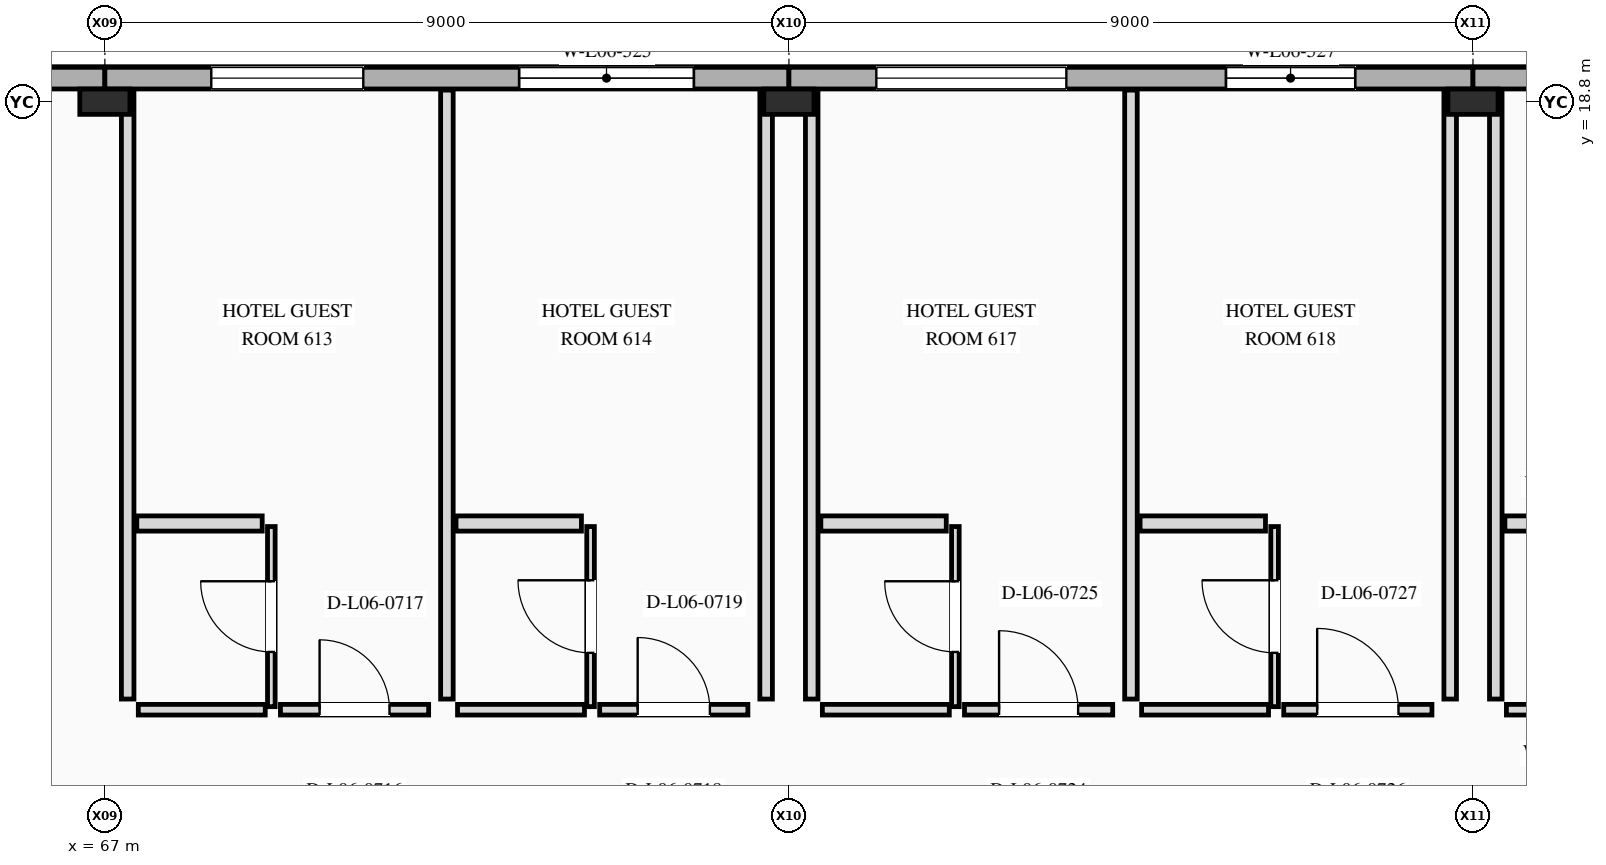
"""IFC4 building model, lengths in metres.
Left out: names, types, materials, properties, quantities, classifications, styles, units other than length and angle.
Written with IfcOpenShell. Run it as: python <this file> out.ifc"""

import sys

from ifc_helpers import new_model, si_unit, direction, frame, frame_2d, origin, origin_2d, place, context, subcontext, project, spatial, rectangle, i_section, extrude, element, fill, save


model = new_model("IFC4")
c1 = context("Model", 3, precision=1e-05, world=origin(), true_north=direction((0.0, 1.0)))
c2 = subcontext(c1, "Body", "Model", "MODEL_VIEW")
j1 = project(units=[si_unit("LENGTHUNIT", "METRE"), si_unit("PLANEANGLEUNIT", "RADIAN")], contexts=[c1])
p1 = place(None, origin())
s1 = spatial("IfcSite", under=j1, at=p1, CompositionType="ELEMENT")
p2 = place(p1, origin())
s2 = spatial("IfcBuilding", under=s1, at=p2, CompositionType="ELEMENT")
p3 = place(p2, frame((0.0, 0.0, 27.0)))
s3 = spatial("IfcBuildingStorey", under=s2, at=p3, CompositionType="ELEMENT", Elevation=27.0)
for number, where, z_axis, x_axis in (
    (1, (67.0, 18.8, 0.0), (0.0, 0.0, 1.0), (0.0, 1.0, 0.0)),
    (2, (76.0, 18.8, 0.0), (0.0, 0.0, 1.0), (0.0, 1.0, 0.0)),
    (3, (85.0, 18.8, 0.0), (0.0, 0.0, 1.0), (0.0, 1.0, 0.0)),
):
    element("IfcColumn", number, at=place(p3, frame(where, z_axis=z_axis, x_axis=x_axis)), inside=s3, PredefinedType="COLUMN", context=c2, shape_type="SweptSolid", body=[
        extrude(i_section(OverallWidth=0.333, OverallDepth=0.66, WebThickness=0.024, FlangeThickness=0.044, at=origin_2d()), origin(), (0.0, 0.0, 1.0), 3.6),
    ])
p4 = place(p3, frame((67.0, 19.11, 0.0), z_axis=(0.0, 0.0, 1.0), x_axis=(-1.0, 0.0, 0.0)))
e4 = element("IfcWall", 4, at=p4, inside=s3, PredefinedType="STANDARD", context=c2, shape_type="SweptSolid", body=[
    extrude(rectangle(XDim=9.0, YDim=0.285, at=frame_2d((4.5, 0.0))), origin(), (0.0, 0.0, 1.0), 3.6),
])
p5 = place(p3, frame((76.0, 19.11, 0.0), z_axis=(0.0, 0.0, 1.0), x_axis=(-1.0, 0.0, 0.0)))
e5 = element("IfcWall", 5, at=p5, inside=s3, PredefinedType="STANDARD", context=c2, shape_type="SweptSolid", body=[
    extrude(rectangle(XDim=9.0, YDim=0.285, at=frame_2d((4.5, 0.0))), origin(), (0.0, 0.0, 1.0), 3.6),
])
p6 = place(p5, frame((5.6, 0.0, 0.85)))
e6 = element("IfcOpeningElement", 6, at=p6, cuts=e5, PredefinedType="OPENING", context=c2, shape_type="SweptSolid", body=[
    extrude(rectangle(XDim=2.0, YDim=1.65, at=frame_2d((1.0, 0.825))), frame((0.0, 0.152, 0.0), z_axis=(0.0, -1.0, 0.0), x_axis=(1.0, 0.0, 0.0)), (0.0, 0.0, 1.0), 0.305),
])
p7 = place(p5, frame((1.25, 0.0, 0.85)))
e7 = element("IfcOpeningElement", 7, at=p7, cuts=e5, PredefinedType="OPENING", context=c2, shape_type="SweptSolid", body=[
    extrude(rectangle(XDim=2.3, YDim=1.7, at=frame_2d((1.15, 0.85))), frame((0.0, 0.152, 0.0), z_axis=(0.0, -1.0, 0.0), x_axis=(1.0, 0.0, 0.0)), (0.0, 0.0, 1.0), 0.305),
])
p8 = place(p3, frame((85.0, 19.11, 0.0), z_axis=(0.0, 0.0, 1.0), x_axis=(-1.0, 0.0, 0.0)))
e8 = element("IfcWall", 8, at=p8, inside=s3, PredefinedType="STANDARD", context=c2, shape_type="SweptSolid", body=[
    extrude(rectangle(XDim=9.0, YDim=0.285, at=frame_2d((4.5, 0.0))), origin(), (0.0, 0.0, 1.0), 3.6),
])
p9 = place(p8, frame((5.35, 0.0, 0.85)))
e9 = element("IfcOpeningElement", 9, at=p9, cuts=e8, PredefinedType="OPENING", context=c2, shape_type="SweptSolid", body=[
    extrude(rectangle(XDim=2.5, YDim=1.75, at=frame_2d((1.25, 0.875))), frame((0.0, 0.152, 0.0), z_axis=(0.0, -1.0, 0.0), x_axis=(1.0, 0.0, 0.0)), (0.0, 0.0, 1.0), 0.305),
])
p10 = place(p8, frame((1.55, 0.0, 0.85)))
e10 = element("IfcOpeningElement", 10, at=p10, cuts=e8, PredefinedType="OPENING", context=c2, shape_type="SweptSolid", body=[
    extrude(rectangle(XDim=1.7, YDim=1.6, at=frame_2d((0.85, 0.8))), frame((0.0, 0.152, 0.0), z_axis=(0.0, -1.0, 0.0), x_axis=(1.0, 0.0, 0.0)), (0.0, 0.0, 1.0), 0.305),
])
p11 = place(p3, frame((94.0, 19.11, 0.0), z_axis=(0.0, 0.0, 1.0), x_axis=(-1.0, 0.0, 0.0)))
e11 = element("IfcWall", 11, at=p11, inside=s3, PredefinedType="STANDARD", context=c2, shape_type="SweptSolid", body=[
    extrude(rectangle(XDim=9.0, YDim=0.285, at=frame_2d((4.5, 0.0))), origin(), (0.0, 0.0, 1.0), 3.6),
])
p12 = place(p3, frame((67.44, 10.8, 0.0), z_axis=(0.0, 0.0, 1.0), x_axis=(1.0, 0.0, 0.0)))
e12 = element("IfcWall", 12, at=p12, inside=s3, PredefinedType="PARTITIONING", context=c2, shape_type="SweptSolid", body=[
    extrude(rectangle(XDim=1.67, YDim=0.14, at=frame_2d((0.835, 0.0))), origin(), (0.0, 0.0, 1.0), 3.29),
])
p13 = place(p3, frame((69.31, 10.8, 0.0), z_axis=(0.0, 0.0, 1.0), x_axis=(1.0, 0.0, 0.0)))
e13 = element("IfcWall", 13, at=p13, inside=s3, PredefinedType="PARTITIONING", context=c2, shape_type="SweptSolid", body=[
    extrude(rectangle(XDim=1.95, YDim=0.14, at=frame_2d((0.975, 0.0))), origin(), (0.0, 0.0, 1.0), 3.29),
])
p14 = place(p13, frame((0.515, 0.0, 0.0)))
e14 = element("IfcOpeningElement", 14, at=p14, cuts=e13, PredefinedType="OPENING", context=c2, shape_type="SweptSolid", body=[
    extrude(rectangle(XDim=0.92, YDim=2.3, at=frame_2d((0.46, 1.15))), frame((0.0, 0.08, 0.0), z_axis=(0.0, -1.0, 0.0), x_axis=(1.0, 0.0, 0.0)), (0.0, 0.0, 1.0), 0.16),
])
p15 = place(p3, frame((67.3, 10.94, 0.0), z_axis=(0.0, 0.0, 1.0), x_axis=(0.0, 1.0, 0.0)))
e15 = element("IfcWall", 15, at=p15, inside=s3, PredefinedType="PARTITIONING", context=c2, shape_type="SweptSolid", body=[
    extrude(rectangle(XDim=8.012, YDim=0.165, at=frame_2d((4.006, 0.0))), origin(), (0.0, 0.0, 1.0), 2.619),
])
p16 = place(p3, frame((71.5, 10.94, 0.0), z_axis=(0.0, 0.0, 1.0), x_axis=(0.0, 1.0, 0.0)))
e16 = element("IfcWall", 16, at=p16, inside=s3, PredefinedType="PARTITIONING", context=c2, shape_type="SweptSolid", body=[
    extrude(rectangle(XDim=8.012, YDim=0.165, at=frame_2d((4.006, 0.0))), origin(), (0.0, 0.0, 1.0), 2.703),
])
p17 = place(p3, frame((69.19, 10.84, 0.0), z_axis=(0.0, 0.0, 1.0), x_axis=(0.0, 1.0, 0.0)))
e17 = element("IfcWall", 17, at=p17, inside=s3, PredefinedType="PARTITIONING", context=c2, shape_type="SweptSolid", body=[
    extrude(rectangle(XDim=2.37, YDim=0.1, at=frame_2d((1.185, 0.0))), origin(), (0.0, 0.0, 1.0), 2.898),
])
p18 = place(p17, frame((0.72, 0.0, 0.0)))
e18 = element("IfcOpeningElement", 18, at=p18, cuts=e17, PredefinedType="OPENING", context=c2, shape_type="SweptSolid", body=[
    extrude(rectangle(XDim=0.93, YDim=2.14, at=frame_2d((0.465, 1.07))), frame((0.0, 0.06, 0.0), z_axis=(0.0, -1.0, 0.0), x_axis=(1.0, 0.0, 0.0)), (0.0, 0.0, 1.0), 0.12),
])
p19 = place(p3, frame((67.42, 13.25, 0.0), z_axis=(0.0, 0.0, 1.0), x_axis=(1.0, 0.0, 0.0)))
e19 = element("IfcWall", 19, at=p19, inside=s3, PredefinedType="PLUMBINGWALL", context=c2, shape_type="SweptSolid", body=[
    extrude(rectangle(XDim=1.65, YDim=0.2, at=frame_2d((0.825, 0.0))), origin(), (0.0, 0.0, 1.0), 3.29),
])
p20 = place(p3, frame((71.64, 10.8, 0.0), z_axis=(0.0, 0.0, 1.0), x_axis=(1.0, 0.0, 0.0)))
e20 = element("IfcWall", 20, at=p20, inside=s3, PredefinedType="PARTITIONING", context=c2, shape_type="SweptSolid", body=[
    extrude(rectangle(XDim=1.67, YDim=0.14, at=frame_2d((0.835, 0.0))), origin(), (0.0, 0.0, 1.0), 3.29),
])
p21 = place(p3, frame((73.51, 10.8, 0.0), z_axis=(0.0, 0.0, 1.0), x_axis=(1.0, 0.0, 0.0)))
e21 = element("IfcWall", 21, at=p21, inside=s3, PredefinedType="PARTITIONING", context=c2, shape_type="SweptSolid", body=[
    extrude(rectangle(XDim=1.95, YDim=0.14, at=frame_2d((0.975, 0.0))), origin(), (0.0, 0.0, 1.0), 3.29),
])
p22 = place(p21, frame((0.5, 0.0, 0.0)))
e22 = element("IfcOpeningElement", 22, at=p22, cuts=e21, PredefinedType="OPENING", context=c2, shape_type="SweptSolid", body=[
    extrude(rectangle(XDim=0.95, YDim=2.3, at=frame_2d((0.475, 1.15))), frame((0.0, 0.08, 0.0), z_axis=(0.0, -1.0, 0.0), x_axis=(1.0, 0.0, 0.0)), (0.0, 0.0, 1.0), 0.16),
])
p23 = place(p3, frame((75.7, 10.94, 0.0), z_axis=(0.0, 0.0, 1.0), x_axis=(0.0, 1.0, 0.0)))
e23 = element("IfcWall", 23, at=p23, inside=s3, PredefinedType="PARTITIONING", context=c2, shape_type="SweptSolid", body=[
    extrude(rectangle(XDim=8.012, YDim=0.165, at=frame_2d((4.006, 0.0))), origin(), (0.0, 0.0, 1.0), 2.619),
])
p24 = place(p3, frame((73.39, 10.84, 0.0), z_axis=(0.0, 0.0, 1.0), x_axis=(0.0, 1.0, 0.0)))
e24 = element("IfcWall", 24, at=p24, inside=s3, PredefinedType="PARTITIONING", context=c2, shape_type="SweptSolid", body=[
    extrude(rectangle(XDim=2.37, YDim=0.1, at=frame_2d((1.185, 0.0))), origin(), (0.0, 0.0, 1.0), 2.898),
])
p25 = place(p24, frame((0.708, 0.0, 0.0)))
e25 = element("IfcOpeningElement", 25, at=p25, cuts=e24, PredefinedType="OPENING", context=c2, shape_type="SweptSolid", body=[
    extrude(rectangle(XDim=0.955, YDim=2.14, at=frame_2d((0.478, 1.07))), frame((0.0, 0.06, 0.0), z_axis=(0.0, -1.0, 0.0), x_axis=(1.0, 0.0, 0.0)), (0.0, 0.0, 1.0), 0.12),
])
p26 = place(p3, frame((71.62, 13.25, 0.0), z_axis=(0.0, 0.0, 1.0), x_axis=(1.0, 0.0, 0.0)))
e26 = element("IfcWall", 26, at=p26, inside=s3, PredefinedType="PLUMBINGWALL", context=c2, shape_type="SweptSolid", body=[
    extrude(rectangle(XDim=1.65, YDim=0.2, at=frame_2d((0.825, 0.0))), origin(), (0.0, 0.0, 1.0), 3.29),
])
p27 = place(p3, frame((76.44, 10.8, 0.0), z_axis=(0.0, 0.0, 1.0), x_axis=(1.0, 0.0, 0.0)))
e27 = element("IfcWall", 27, at=p27, inside=s3, PredefinedType="PARTITIONING", context=c2, shape_type="SweptSolid", body=[
    extrude(rectangle(XDim=1.67, YDim=0.14, at=frame_2d((0.835, 0.0))), origin(), (0.0, 0.0, 1.0), 3.29),
])
p28 = place(p3, frame((78.31, 10.8, 0.0), z_axis=(0.0, 0.0, 1.0), x_axis=(1.0, 0.0, 0.0)))
e28 = element("IfcWall", 28, at=p28, inside=s3, PredefinedType="PARTITIONING", context=c2, shape_type="SweptSolid", body=[
    extrude(rectangle(XDim=1.95, YDim=0.14, at=frame_2d((0.975, 0.0))), origin(), (0.0, 0.0, 1.0), 3.29),
])
p29 = place(p28, frame((0.455, 0.0, 0.0)))
e29 = element("IfcOpeningElement", 29, at=p29, cuts=e28, PredefinedType="OPENING", context=c2, shape_type="SweptSolid", body=[
    extrude(rectangle(XDim=1.04, YDim=2.4, at=frame_2d((0.52, 1.2))), frame((0.0, 0.08, 0.0), z_axis=(0.0, -1.0, 0.0), x_axis=(1.0, 0.0, 0.0)), (0.0, 0.0, 1.0), 0.16),
])
p30 = place(p3, frame((76.3, 10.94, 0.0), z_axis=(0.0, 0.0, 1.0), x_axis=(0.0, 1.0, 0.0)))
e30 = element("IfcWall", 30, at=p30, inside=s3, PredefinedType="PARTITIONING", context=c2, shape_type="SweptSolid", body=[
    extrude(rectangle(XDim=8.012, YDim=0.165, at=frame_2d((4.006, 0.0))), origin(), (0.0, 0.0, 1.0), 2.619),
])
p31 = place(p3, frame((80.5, 10.94, 0.0), z_axis=(0.0, 0.0, 1.0), x_axis=(0.0, 1.0, 0.0)))
e31 = element("IfcWall", 31, at=p31, inside=s3, PredefinedType="PARTITIONING", context=c2, shape_type="SweptSolid", body=[
    extrude(rectangle(XDim=8.012, YDim=0.165, at=frame_2d((4.006, 0.0))), origin(), (0.0, 0.0, 1.0), 2.703),
])
p32 = place(p3, frame((78.19, 10.84, 0.0), z_axis=(0.0, 0.0, 1.0), x_axis=(0.0, 1.0, 0.0)))
e32 = element("IfcWall", 32, at=p32, inside=s3, PredefinedType="PARTITIONING", context=c2, shape_type="SweptSolid", body=[
    extrude(rectangle(XDim=2.37, YDim=0.1, at=frame_2d((1.185, 0.0))), origin(), (0.0, 0.0, 1.0), 2.898),
])
p33 = place(p32, frame((0.72, 0.0, 0.0)))
e33 = element("IfcOpeningElement", 33, at=p33, cuts=e32, PredefinedType="OPENING", context=c2, shape_type="SweptSolid", body=[
    extrude(rectangle(XDim=0.93, YDim=2.22, at=frame_2d((0.465, 1.11))), frame((0.0, 0.06, 0.0), z_axis=(0.0, -1.0, 0.0), x_axis=(1.0, 0.0, 0.0)), (0.0, 0.0, 1.0), 0.12),
])
p34 = place(p3, frame((76.42, 13.25, 0.0), z_axis=(0.0, 0.0, 1.0), x_axis=(1.0, 0.0, 0.0)))
e34 = element("IfcWall", 34, at=p34, inside=s3, PredefinedType="PLUMBINGWALL", context=c2, shape_type="SweptSolid", body=[
    extrude(rectangle(XDim=1.65, YDim=0.2, at=frame_2d((0.825, 0.0))), origin(), (0.0, 0.0, 1.0), 3.29),
])
p35 = place(p3, frame((80.64, 10.8, 0.0), z_axis=(0.0, 0.0, 1.0), x_axis=(1.0, 0.0, 0.0)))
e35 = element("IfcWall", 35, at=p35, inside=s3, PredefinedType="PARTITIONING", context=c2, shape_type="SweptSolid", body=[
    extrude(rectangle(XDim=1.67, YDim=0.14, at=frame_2d((0.835, 0.0))), origin(), (0.0, 0.0, 1.0), 3.29),
])
p36 = place(p3, frame((82.51, 10.8, 0.0), z_axis=(0.0, 0.0, 1.0), x_axis=(1.0, 0.0, 0.0)))
e36 = element("IfcWall", 36, at=p36, inside=s3, PredefinedType="PARTITIONING", context=c2, shape_type="SweptSolid", body=[
    extrude(rectangle(XDim=1.95, YDim=0.14, at=frame_2d((0.975, 0.0))), origin(), (0.0, 0.0, 1.0), 3.29),
])
p37 = place(p36, frame((0.44, 0.0, 0.0)))
e37 = element("IfcOpeningElement", 37, at=p37, cuts=e36, PredefinedType="OPENING", context=c2, shape_type="SweptSolid", body=[
    extrude(rectangle(XDim=1.07, YDim=2.4, at=frame_2d((0.535, 1.2))), frame((0.0, 0.08, 0.0), z_axis=(0.0, -1.0, 0.0), x_axis=(1.0, 0.0, 0.0)), (0.0, 0.0, 1.0), 0.16),
])
p38 = place(p3, frame((84.7, 10.94, 0.0), z_axis=(0.0, 0.0, 1.0), x_axis=(0.0, 1.0, 0.0)))
e38 = element("IfcWall", 38, at=p38, inside=s3, PredefinedType="PARTITIONING", context=c2, shape_type="SweptSolid", body=[
    extrude(rectangle(XDim=8.012, YDim=0.165, at=frame_2d((4.006, 0.0))), origin(), (0.0, 0.0, 1.0), 2.619),
])
p39 = place(p3, frame((82.39, 10.84, 0.0), z_axis=(0.0, 0.0, 1.0), x_axis=(0.0, 1.0, 0.0)))
e39 = element("IfcWall", 39, at=p39, inside=s3, PredefinedType="PARTITIONING", context=c2, shape_type="SweptSolid", body=[
    extrude(rectangle(XDim=2.37, YDim=0.1, at=frame_2d((1.185, 0.0))), origin(), (0.0, 0.0, 1.0), 2.898),
])
p40 = place(p39, frame((0.708, 0.0, 0.0)))
e40 = element("IfcOpeningElement", 40, at=p40, cuts=e39, PredefinedType="OPENING", context=c2, shape_type="SweptSolid", body=[
    extrude(rectangle(XDim=0.955, YDim=2.22, at=frame_2d((0.478, 1.11))), frame((0.0, 0.06, 0.0), z_axis=(0.0, -1.0, 0.0), x_axis=(1.0, 0.0, 0.0)), (0.0, 0.0, 1.0), 0.12),
])
p41 = place(p3, frame((80.62, 13.25, 0.0), z_axis=(0.0, 0.0, 1.0), x_axis=(1.0, 0.0, 0.0)))
e41 = element("IfcWall", 41, at=p41, inside=s3, PredefinedType="PLUMBINGWALL", context=c2, shape_type="SweptSolid", body=[
    extrude(rectangle(XDim=1.65, YDim=0.2, at=frame_2d((0.825, 0.0))), origin(), (0.0, 0.0, 1.0), 3.29),
])
p42 = place(p3, frame((85.44, 10.8, 0.0), z_axis=(0.0, 0.0, 1.0), x_axis=(1.0, 0.0, 0.0)))
e42 = element("IfcWall", 42, at=p42, inside=s3, PredefinedType="PARTITIONING", context=c2, shape_type="SweptSolid", body=[
    extrude(rectangle(XDim=1.93, YDim=0.14, at=frame_2d((0.965, 0.0))), origin(), (0.0, 0.0, 1.0), 3.29),
])
p43 = place(p3, frame((85.3, 10.94, 0.0), z_axis=(0.0, 0.0, 1.0), x_axis=(0.0, 1.0, 0.0)))
e43 = element("IfcWall", 43, at=p43, inside=s3, PredefinedType="PARTITIONING", context=c2, shape_type="SweptSolid", body=[
    extrude(rectangle(XDim=8.012, YDim=0.165, at=frame_2d((4.006, 0.0))), origin(), (0.0, 0.0, 1.0), 2.619),
])
p44 = place(p3, frame((85.42, 13.25, 0.0), z_axis=(0.0, 0.0, 1.0), x_axis=(1.0, 0.0, 0.0)))
e44 = element("IfcWall", 44, at=p44, inside=s3, PredefinedType="PLUMBINGWALL", context=c2, shape_type="SweptSolid", body=[
    extrude(rectangle(XDim=1.91, YDim=0.2, at=frame_2d((0.955, 0.0))), origin(), (0.0, 0.0, 1.0), 3.29),
])
p45 = place(p6, origin())
e45 = element("IfcWindow", 45, at=p45, inside=s3, PartitioningType="SINGLE_PANEL", PredefinedType="WINDOW", context=c2, shape_type="SweptSolid", body=[
    extrude(rectangle(XDim=2.0, YDim=1.65, at=frame_2d((1.0, 0.825))), frame((0.0, 0.03, 0.0), z_axis=(0.0, -1.0, 0.0), x_axis=(1.0, 0.0, 0.0)), (0.0, 0.0, 1.0), 0.06),
])
fill(e6, e45)
p46 = place(p7, origin())
e46 = element("IfcWindow", 46, at=p46, inside=s3, PartitioningType="SINGLE_PANEL", PredefinedType="WINDOW", context=c2, shape_type="SweptSolid", body=[
    extrude(rectangle(XDim=2.3, YDim=1.7, at=frame_2d((1.15, 0.85))), frame((0.0, 0.03, 0.0), z_axis=(0.0, -1.0, 0.0), x_axis=(1.0, 0.0, 0.0)), (0.0, 0.0, 1.0), 0.06),
])
fill(e7, e46)
p47 = place(p9, origin())
e47 = element("IfcWindow", 47, at=p47, inside=s3, PartitioningType="SINGLE_PANEL", PredefinedType="WINDOW", context=c2, shape_type="SweptSolid", body=[
    extrude(rectangle(XDim=2.5, YDim=1.75, at=frame_2d((1.25, 0.875))), frame((0.0, 0.03, 0.0), z_axis=(0.0, -1.0, 0.0), x_axis=(1.0, 0.0, 0.0)), (0.0, 0.0, 1.0), 0.06),
])
fill(e9, e47)
p48 = place(p10, origin())
e48 = element("IfcWindow", 48, at=p48, inside=s3, PartitioningType="SINGLE_PANEL", PredefinedType="WINDOW", context=c2, shape_type="SweptSolid", body=[
    extrude(rectangle(XDim=1.7, YDim=1.6, at=frame_2d((0.85, 0.8))), frame((0.0, 0.03, 0.0), z_axis=(0.0, -1.0, 0.0), x_axis=(1.0, 0.0, 0.0)), (0.0, 0.0, 1.0), 0.06),
])
fill(e10, e48)
p49 = place(p14, origin())
e49 = element("IfcDoor", 49, at=p49, inside=s3, OperationType="SINGLE_SWING_LEFT", PredefinedType="DOOR", context=c2, shape_type="SweptSolid", body=[
    extrude(rectangle(XDim=0.92, YDim=2.3, at=frame_2d((0.46, 1.15))), frame((0.0, 0.025, 0.0), z_axis=(0.0, -1.0, 0.0), x_axis=(1.0, 0.0, 0.0)), (0.0, 0.0, 1.0), 0.05),
])
fill(e14, e49)
p50 = place(p18, origin())
e50 = element("IfcDoor", 50, at=p50, inside=s3, OperationType="SINGLE_SWING_RIGHT", PredefinedType="DOOR", context=c2, shape_type="SweptSolid", body=[
    extrude(rectangle(XDim=0.93, YDim=2.14, at=frame_2d((0.465, 1.07))), frame((0.0, 0.025, 0.0), z_axis=(0.0, -1.0, 0.0), x_axis=(1.0, 0.0, 0.0)), (0.0, 0.0, 1.0), 0.05),
])
fill(e18, e50)
p51 = place(p22, origin())
e51 = element("IfcDoor", 51, at=p51, inside=s3, OperationType="SINGLE_SWING_LEFT", PredefinedType="DOOR", context=c2, shape_type="SweptSolid", body=[
    extrude(rectangle(XDim=0.95, YDim=2.3, at=frame_2d((0.475, 1.15))), frame((0.0, 0.025, 0.0), z_axis=(0.0, -1.0, 0.0), x_axis=(1.0, 0.0, 0.0)), (0.0, 0.0, 1.0), 0.05),
])
fill(e22, e51)
p52 = place(p25, origin())
e52 = element("IfcDoor", 52, at=p52, inside=s3, OperationType="SINGLE_SWING_RIGHT", PredefinedType="DOOR", context=c2, shape_type="SweptSolid", body=[
    extrude(rectangle(XDim=0.955, YDim=2.14, at=frame_2d((0.478, 1.07))), frame((0.0, 0.025, 0.0), z_axis=(0.0, -1.0, 0.0), x_axis=(1.0, 0.0, 0.0)), (0.0, 0.0, 1.0), 0.05),
])
fill(e25, e52)
p53 = place(p29, origin())
e53 = element("IfcDoor", 53, at=p53, inside=s3, OperationType="SINGLE_SWING_LEFT", PredefinedType="DOOR", context=c2, shape_type="SweptSolid", body=[
    extrude(rectangle(XDim=1.04, YDim=2.4, at=frame_2d((0.52, 1.2))), frame((0.0, 0.025, 0.0), z_axis=(0.0, -1.0, 0.0), x_axis=(1.0, 0.0, 0.0)), (0.0, 0.0, 1.0), 0.05),
])
fill(e29, e53)
p54 = place(p33, origin())
e54 = element("IfcDoor", 54, at=p54, inside=s3, OperationType="SINGLE_SWING_RIGHT", PredefinedType="DOOR", context=c2, shape_type="SweptSolid", body=[
    extrude(rectangle(XDim=0.93, YDim=2.22, at=frame_2d((0.465, 1.11))), frame((0.0, 0.025, 0.0), z_axis=(0.0, -1.0, 0.0), x_axis=(1.0, 0.0, 0.0)), (0.0, 0.0, 1.0), 0.05),
])
fill(e33, e54)
p55 = place(p37, origin())
e55 = element("IfcDoor", 55, at=p55, inside=s3, OperationType="SINGLE_SWING_LEFT", PredefinedType="DOOR", context=c2, shape_type="SweptSolid", body=[
    extrude(rectangle(XDim=1.07, YDim=2.4, at=frame_2d((0.535, 1.2))), frame((0.0, 0.025, 0.0), z_axis=(0.0, -1.0, 0.0), x_axis=(1.0, 0.0, 0.0)), (0.0, 0.0, 1.0), 0.05),
])
fill(e37, e55)
p56 = place(p40, origin())
e56 = element("IfcDoor", 56, at=p56, inside=s3, OperationType="SINGLE_SWING_RIGHT", PredefinedType="DOOR", context=c2, shape_type="SweptSolid", body=[
    extrude(rectangle(XDim=0.955, YDim=2.22, at=frame_2d((0.478, 1.11))), frame((0.0, 0.025, 0.0), z_axis=(0.0, -1.0, 0.0), x_axis=(1.0, 0.0, 0.0)), (0.0, 0.0, 1.0), 0.05),
])
fill(e40, e56)
save(model, sys.argv[1])
